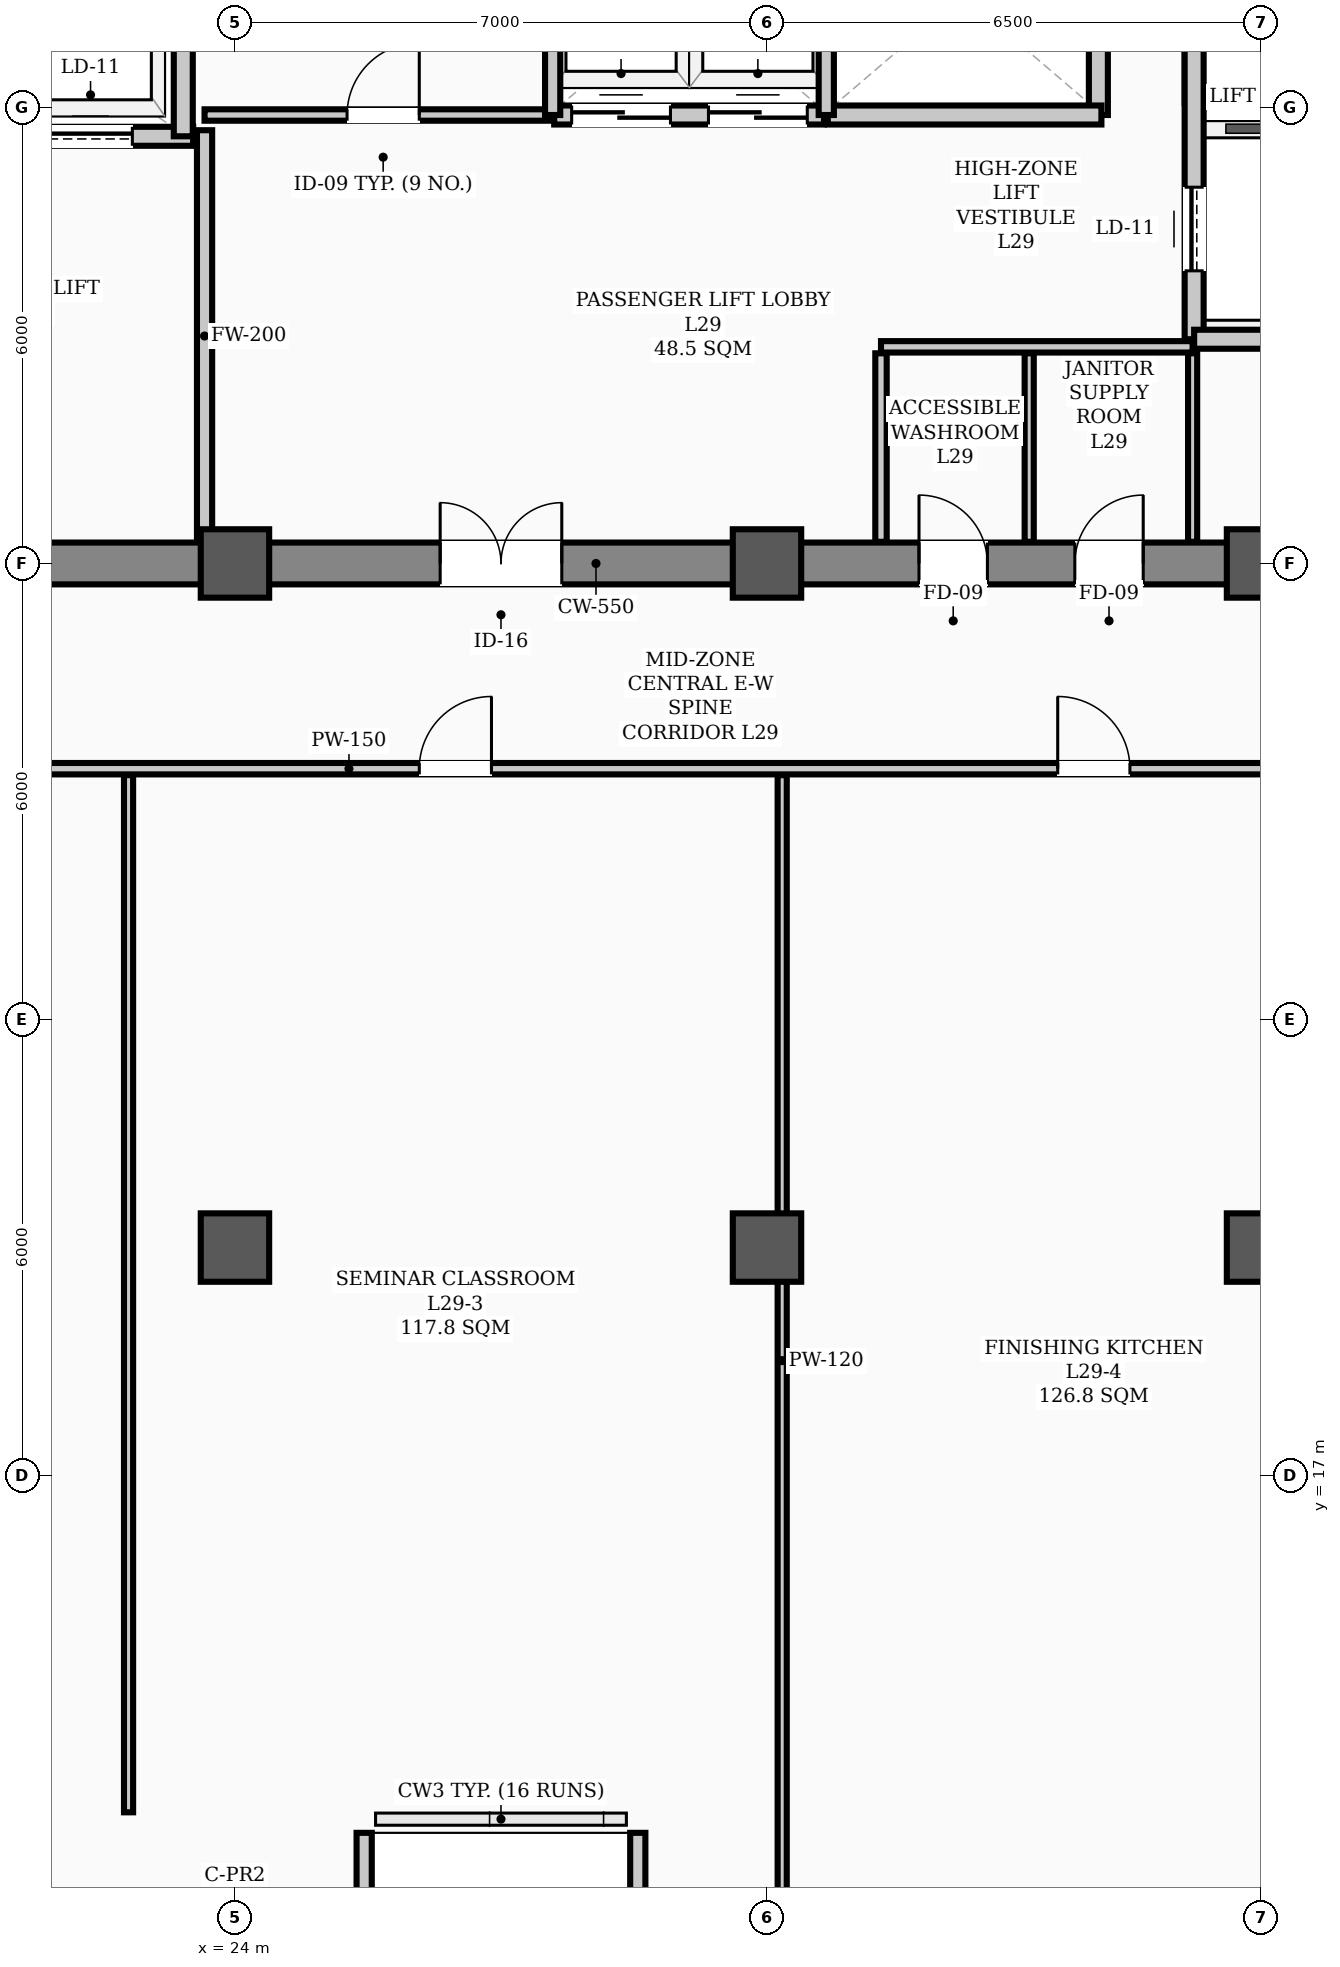
"""IFC4 building model, lengths in metres.
Left out: names, types, materials, properties, quantities, classifications, styles, units other than length and angle.
Written with IfcOpenShell. Run it as: python <this file> out.ifc"""

import sys

from ifc_helpers import new_model, si_unit, direction, frame, frame_2d, origin, origin_2d, place, context, subcontext, project, spatial, rectangle, hollow_rectangle, extrude, element, fill, save


model = new_model("IFC4")
c1 = context("Model", 3, precision=1e-05, world=origin(), true_north=direction((0.0, 1.0)))
c2 = subcontext(c1, "Body", "Model", "MODEL_VIEW")
j1 = project(units=[si_unit("LENGTHUNIT", "METRE"), si_unit("PLANEANGLEUNIT", "RADIAN")], contexts=[c1])
p1 = place(None, origin())
s1 = spatial("IfcSite", under=j1, at=p1, CompositionType="ELEMENT")
p2 = place(p1, origin())
s2 = spatial("IfcBuilding", under=s1, at=p2, CompositionType="ELEMENT")
p3 = place(p2, frame((0.0, 0.0, 118.8)))
s3 = spatial("IfcBuildingStorey", under=s2, at=p3, CompositionType="ELEMENT", Elevation=118.8)
for number, where, z_axis, x_axis in (
    (1, (24.0, 29.0, 0.0), (0.0, 0.0, 1.0), (1.0, 0.0, 0.0)),
    (2, (31.0, 29.0, 0.0), (0.0, 0.0, 1.0), (1.0, 0.0, 0.0)),
    (3, (37.5, 29.0, 0.0), (0.0, 0.0, 1.0), (1.0, 0.0, 0.0)),
    (4, (24.0, 20.0, 0.0), (0.0, 0.0, 1.0), (1.0, 0.0, 0.0)),
    (5, (31.0, 20.0, 0.0), (0.0, 0.0, 1.0), (1.0, 0.0, 0.0)),
    (6, (37.5, 20.0, 0.0), (0.0, 0.0, 1.0), (1.0, 0.0, 0.0)),
):
    element("IfcColumn", number, at=place(p3, frame(where, z_axis=z_axis, x_axis=x_axis)), inside=s3, PredefinedType="COLUMN", context=c2, shape_type="SweptSolid", body=[
        extrude(hollow_rectangle(XDim=0.9, YDim=0.9, WallThickness=0.035, InnerFilletRadius=0.017, OuterFilletRadius=0.052, at=origin_2d()), origin(), (0.0, 0.0, 1.0), 3.9),
    ])
for number, where, z_axis, x_axis in (
    (7, (25.7, 10.6, 0.0), (0.0, 0.0, 1.0), (0.0, 1.0, 0.0)),
    (8, (29.3, 12.3, 0.0), (0.0, 0.0, 1.0), (0.0, -1.0, 0.0)),
):
    element("IfcWall", number, at=place(p3, frame(where, z_axis=z_axis, x_axis=x_axis)), inside=s3, PredefinedType="PARAPET", context=c2, shape_type="SweptSolid", body=[
        extrude(rectangle(XDim=1.7, YDim=0.2, at=frame_2d((0.85, 0.0))), origin(), (0.0, 0.0, 1.0), 1.2),
    ])
p4 = place(p3, frame((13.5, 29.0, 0.0), z_axis=(0.0, 0.0, 1.0), x_axis=(1.0, 0.0, 0.0)))
e9 = element("IfcWall", 9, at=p4, inside=s3, PredefinedType="SHEAR", context=c2, shape_type="SweptSolid", body=[
    extrude(rectangle(XDim=30.5, YDim=0.55, at=frame_2d((15.25, 0.0))), origin(), (0.0, 0.0, 1.0), 3.72),
])
p5 = place(p4, frame((1.75, 0.0, 0.0)))
e10 = element("IfcOpeningElement", 10, at=p5, cuts=e9, PredefinedType="OPENING", context=c2, shape_type="SweptSolid", body=[
    extrude(rectangle(XDim=1.1, YDim=2.08, at=frame_2d((0.55, 1.04))), frame((0.0, 0.285, 0.0), z_axis=(0.0, -1.0, 0.0), x_axis=(1.0, 0.0, 0.0)), (0.0, 0.0, 1.0), 0.57),
])
p6 = place(p4, frame((26.7, 0.0, 0.0)))
e11 = element("IfcOpeningElement", 11, at=p6, cuts=e9, PredefinedType="OPENING", context=c2, shape_type="SweptSolid", body=[
    extrude(rectangle(XDim=1.1, YDim=2.08, at=frame_2d((0.55, 1.04))), frame((0.0, 0.285, 0.0), z_axis=(0.0, -1.0, 0.0), x_axis=(1.0, 0.0, 0.0)), (0.0, 0.0, 1.0), 0.57),
])
p7 = place(p4, frame((6.8, 0.0, 0.0)))
e12 = element("IfcOpeningElement", 12, at=p7, cuts=e9, PredefinedType="OPENING", context=c2, shape_type="SweptSolid", body=[
    extrude(rectangle(XDim=1.1, YDim=2.08, at=frame_2d((0.55, 1.04))), frame((0.0, 0.285, 0.0), z_axis=(0.0, -1.0, 0.0), x_axis=(1.0, 0.0, 0.0)), (0.0, 0.0, 1.0), 0.57),
])
p8 = place(p4, frame((13.2, 0.0, 0.0)))
e13 = element("IfcOpeningElement", 13, at=p8, cuts=e9, PredefinedType="OPENING", context=c2, shape_type="SweptSolid", body=[
    extrude(rectangle(XDim=1.6, YDim=2.08, at=frame_2d((0.8, 1.04))), frame((0.0, 0.285, 0.0), z_axis=(0.0, -1.0, 0.0), x_axis=(1.0, 0.0, 0.0)), (0.0, 0.0, 1.0), 0.57),
])
p9 = place(p4, frame((19.5, 0.0, 0.0)))
e14 = element("IfcOpeningElement", 14, at=p9, cuts=e9, PredefinedType="OPENING", context=c2, shape_type="SweptSolid", body=[
    extrude(rectangle(XDim=0.9, YDim=2.08, at=frame_2d((0.45, 1.04))), frame((0.0, 0.285, 0.0), z_axis=(0.0, -1.0, 0.0), x_axis=(1.0, 0.0, 0.0)), (0.0, 0.0, 1.0), 0.57),
])
p10 = place(p4, frame((21.55, 0.0, 0.0)))
e15 = element("IfcOpeningElement", 15, at=p10, cuts=e9, PredefinedType="OPENING", context=c2, shape_type="SweptSolid", body=[
    extrude(rectangle(XDim=0.9, YDim=2.08, at=frame_2d((0.45, 1.04))), frame((0.0, 0.285, 0.0), z_axis=(0.0, -1.0, 0.0), x_axis=(1.0, 0.0, 0.0)), (0.0, 0.0, 1.0), 0.57),
])
p11 = place(p3, frame((18.1, 34.62, 0.0), z_axis=(0.0, 0.0, 1.0), x_axis=(1.0, 0.0, 0.0)))
e16 = element("IfcWall", 16, at=p11, inside=s3, PredefinedType="STANDARD", context=c2, shape_type="SweptSolid", body=[
    extrude(rectangle(XDim=5.35, YDim=0.25, at=frame_2d((2.675, 0.0))), origin(), (0.0, 0.0, 1.0), 3.72),
])
p12 = place(p11, frame((0.85, 0.0, 0.0)))
e17 = element("IfcOpeningElement", 17, at=p12, cuts=e16, PredefinedType="OPENING", context=c2, shape_type="SweptSolid", body=[
    extrude(rectangle(XDim=1.1, YDim=2.08, at=frame_2d((0.55, 1.04))), frame((0.0, 0.135, 0.0), z_axis=(0.0, -1.0, 0.0), x_axis=(1.0, 0.0, 0.0)), (0.0, 0.0, 1.0), 0.27),
])
p13 = place(p11, frame((3.45, 0.0, 0.0)))
e18 = element("IfcOpeningElement", 18, at=p13, cuts=e16, PredefinedType="OPENING", context=c2, shape_type="SweptSolid", body=[
    extrude(rectangle(XDim=1.1, YDim=2.08, at=frame_2d((0.55, 1.04))), frame((0.0, 0.135, 0.0), z_axis=(0.0, -1.0, 0.0), x_axis=(1.0, 0.0, 0.0)), (0.0, 0.0, 1.0), 0.27),
])
p14 = place(p3, frame((36.62, 31.95, 0.0), z_axis=(0.0, 0.0, 1.0), x_axis=(0.0, 1.0, 0.0)))
e19 = element("IfcWall", 19, at=p14, inside=s3, PredefinedType="STANDARD", context=c2, shape_type="SweptSolid", body=[
    extrude(rectangle(XDim=6.0, YDim=0.25, at=frame_2d((3.0, 0.0))), origin(), (0.0, 0.0, 1.0), 3.72),
])
p15 = place(p14, frame((0.9, 0.0, 0.0)))
e20 = element("IfcOpeningElement", 20, at=p15, cuts=e19, PredefinedType="OPENING", context=c2, shape_type="SweptSolid", body=[
    extrude(rectangle(XDim=1.1, YDim=2.08, at=frame_2d((0.55, 1.04))), frame((0.0, 0.135, 0.0), z_axis=(0.0, -1.0, 0.0), x_axis=(1.0, 0.0, 0.0)), (0.0, 0.0, 1.0), 0.27),
])
p16 = place(p14, frame((4.0, 0.0, 0.0)))
e21 = element("IfcOpeningElement", 21, at=p16, cuts=e19, PredefinedType="OPENING", context=c2, shape_type="SweptSolid", body=[
    extrude(rectangle(XDim=1.1, YDim=2.08, at=frame_2d((0.55, 1.04))), frame((0.0, 0.135, 0.0), z_axis=(0.0, -1.0, 0.0), x_axis=(1.0, 0.0, 0.0)), (0.0, 0.0, 1.0), 0.27),
])
p17 = place(p3, frame((36.62, 31.95, 0.0), z_axis=(0.0, 0.0, 1.0), x_axis=(1.0, 0.0, 0.0)))
e22 = element("IfcWall", 22, at=p17, inside=s3, PredefinedType="STANDARD", context=c2, shape_type="SweptSolid", body=[
    extrude(rectangle(XDim=1.9, YDim=0.25, at=frame_2d((0.95, 0.0))), origin(), (0.0, 0.0, 1.0), 3.48),
])
p18 = place(p3, frame((23.32, 34.62, 0.0), z_axis=(0.0, 0.0, 1.0), x_axis=(0.0, 1.0, 0.0)))
e23 = element("IfcWall", 23, at=p18, inside=s3, PredefinedType="STANDARD", context=c2, shape_type="SweptSolid", body=[
    extrude(rectangle(XDim=3.33, YDim=0.25, at=frame_2d((1.665, 0.0))), origin(), (0.0, 0.0, 1.0), 3.72),
])
p19 = place(p3, frame((35.36, 34.9, 0.0), z_axis=(0.0, 0.0, 1.0), x_axis=(0.0, 1.0, 0.0)))
e24 = element("IfcWall", 24, at=p19, inside=s3, PredefinedType="STANDARD", context=c2, shape_type="SweptSolid", body=[
    extrude(rectangle(XDim=3.05, YDim=0.25, at=frame_2d((1.525, 0.0))), origin(), (0.0, 0.0, 1.0), 3.72),
])
p20 = place(p3, frame((28.2, 34.9, 0.0), z_axis=(0.0, 0.0, 1.0), x_axis=(1.0, 0.0, 0.0)))
e25 = element("IfcWall", 25, at=p20, inside=s3, PredefinedType="STANDARD", context=c2, shape_type="SweptSolid", body=[
    extrude(rectangle(XDim=3.55, YDim=0.25, at=frame_2d((1.775, 0.0))), origin(), (0.0, 0.0, 1.0), 3.72),
])
p21 = place(p20, frame((0.23, 0.0, 0.0)))
e26 = element("IfcOpeningElement", 26, at=p21, cuts=e25, PredefinedType="OPENING", context=c2, shape_type="SweptSolid", body=[
    extrude(rectangle(XDim=1.3, YDim=2.08, at=frame_2d((0.65, 1.04))), frame((0.0, 0.135, 0.0), z_axis=(0.0, -1.0, 0.0), x_axis=(1.0, 0.0, 0.0)), (0.0, 0.0, 1.0), 0.27),
])
p22 = place(p20, frame((2.03, 0.0, 0.0)))
e27 = element("IfcOpeningElement", 27, at=p22, cuts=e25, PredefinedType="OPENING", context=c2, shape_type="SweptSolid", body=[
    extrude(rectangle(XDim=1.3, YDim=2.08, at=frame_2d((0.65, 1.04))), frame((0.0, 0.135, 0.0), z_axis=(0.0, -1.0, 0.0), x_axis=(1.0, 0.0, 0.0)), (0.0, 0.0, 1.0), 0.27),
])
p23 = place(p3, frame((31.8, 34.9, 0.0), z_axis=(0.0, 0.0, 1.0), x_axis=(1.0, 0.0, 0.0)))
e28 = element("IfcWall", 28, at=p23, inside=s3, PredefinedType="STANDARD", context=c2, shape_type="SweptSolid", body=[
    extrude(rectangle(XDim=3.6, YDim=0.25, at=frame_2d((1.8, 0.0))), origin(), (0.0, 0.0, 1.0), 3.72),
])
p24 = place(p3, frame((23.6, 34.9, 0.0), z_axis=(0.0, 0.0, 1.0), x_axis=(1.0, 0.0, 0.0)))
e29 = element("IfcWall", 29, at=p24, inside=s3, PredefinedType="PARTITIONING", context=c2, shape_type="SweptSolid", body=[
    extrude(rectangle(XDim=4.58, YDim=0.15, at=frame_2d((2.29, 0.0))), origin(), (0.0, 0.0, 1.0), 3.72),
])
p25 = place(p24, frame((1.875, 0.0, 0.0)))
e30 = element("IfcOpeningElement", 30, at=p25, cuts=e29, PredefinedType="OPENING", context=c2, shape_type="SweptSolid", body=[
    extrude(rectangle(XDim=0.95, YDim=2.08, at=frame_2d((0.475, 1.04))), frame((0.0, 0.085, 0.0), z_axis=(0.0, -1.0, 0.0), x_axis=(1.0, 0.0, 0.0)), (0.0, 0.0, 1.0), 0.17),
])
p26 = place(p3, frame((32.5, 31.85, 0.0), z_axis=(0.0, 0.0, 1.0), x_axis=(1.0, 0.0, 0.0)))
e31 = element("IfcWall", 31, at=p26, inside=s3, PredefinedType="PARTITIONING", context=c2, shape_type="SweptSolid", body=[
    extrude(rectangle(XDim=4.1, YDim=0.15, at=frame_2d((2.05, 0.0))), origin(), (0.0, 0.0, 1.0), 3.72),
])
p27 = place(p3, frame((2.31, 26.3, 0.0), z_axis=(0.0, 0.0, 1.0), x_axis=(1.0, 0.0, 0.0)))
e32 = element("IfcWall", 32, at=p27, inside=s3, PredefinedType="PARTITIONING", context=c2, shape_type="SweptSolid", body=[
    extrude(rectangle(XDim=46.38, YDim=0.15, at=frame_2d((23.19, 0.0))), origin(), (0.0, 0.0, 1.0), 3.1),
])
p28 = place(p27, frame((10.19, 0.0, 0.0)))
e33 = element("IfcOpeningElement", 33, at=p28, cuts=e32, PredefinedType="OPENING", context=c2, shape_type="SweptSolid", body=[
    extrude(rectangle(XDim=0.95, YDim=2.08, at=frame_2d((0.475, 1.04))), frame((0.0, 0.085, 0.0), z_axis=(0.0, -1.0, 0.0), x_axis=(1.0, 0.0, 0.0)), (0.0, 0.0, 1.0), 0.17),
])
p29 = place(p27, frame((15.915, 0.0, 0.0)))
e34 = element("IfcOpeningElement", 34, at=p29, cuts=e32, PredefinedType="OPENING", context=c2, shape_type="SweptSolid", body=[
    extrude(rectangle(XDim=0.95, YDim=2.08, at=frame_2d((0.475, 1.04))), frame((0.0, 0.085, 0.0), z_axis=(0.0, -1.0, 0.0), x_axis=(1.0, 0.0, 0.0)), (0.0, 0.0, 1.0), 0.17),
])
p30 = place(p27, frame((24.115, 0.0, 0.0)))
e35 = element("IfcOpeningElement", 35, at=p30, cuts=e32, PredefinedType="OPENING", context=c2, shape_type="SweptSolid", body=[
    extrude(rectangle(XDim=0.95, YDim=2.08, at=frame_2d((0.475, 1.04))), frame((0.0, 0.085, 0.0), z_axis=(0.0, -1.0, 0.0), x_axis=(1.0, 0.0, 0.0)), (0.0, 0.0, 1.0), 0.17),
])
p31 = place(p27, frame((32.515, 0.0, 0.0)))
e36 = element("IfcOpeningElement", 36, at=p31, cuts=e32, PredefinedType="OPENING", context=c2, shape_type="SweptSolid", body=[
    extrude(rectangle(XDim=0.95, YDim=2.08, at=frame_2d((0.475, 1.04))), frame((0.0, 0.085, 0.0), z_axis=(0.0, -1.0, 0.0), x_axis=(1.0, 0.0, 0.0)), (0.0, 0.0, 1.0), 0.17),
])
p32 = place(p27, frame((37.665, 0.0, 0.0)))
e37 = element("IfcOpeningElement", 37, at=p32, cuts=e32, PredefinedType="OPENING", context=c2, shape_type="SweptSolid", body=[
    extrude(rectangle(XDim=0.95, YDim=2.08, at=frame_2d((0.475, 1.04))), frame((0.0, 0.085, 0.0), z_axis=(0.0, -1.0, 0.0), x_axis=(1.0, 0.0, 0.0)), (0.0, 0.0, 1.0), 0.17),
])
p33 = place(p3, frame((23.6, 29.285, 0.0), z_axis=(0.0, 0.0, 1.0), x_axis=(0.0, 1.0, 0.0)))
e38 = element("IfcWall", 38, at=p33, inside=s3, PredefinedType="STANDARD", context=c2, shape_type="SweptSolid", body=[
    extrude(rectangle(XDim=5.415, YDim=0.2, at=frame_2d((2.708, 0.0))), origin(), (0.0, 0.0, 1.0), 3.1),
])
p34 = place(p3, frame((32.5, 29.285, 0.0), z_axis=(0.0, 0.0, 1.0), x_axis=(0.0, 1.0, 0.0)))
e39 = element("IfcWall", 39, at=p34, inside=s3, PredefinedType="PARTITIONING", context=c2, shape_type="SweptSolid", body=[
    extrude(rectangle(XDim=2.48, YDim=0.15, at=frame_2d((1.24, 0.0))), origin(), (0.0, 0.0, 1.0), 3.3),
])
for number, where, z_axis, x_axis in (
    (40, (36.6, 29.285, 0.0), (0.0, 0.0, 1.0), (0.0, 1.0, 0.0)),
    (41, (34.45, 29.285, 0.0), (0.0, 0.0, 1.0), (0.0, 1.0, 0.0)),
):
    element("IfcWall", number, at=place(p3, frame(where, z_axis=z_axis, x_axis=x_axis)), inside=s3, PredefinedType="PARTITIONING", context=c2, shape_type="SweptSolid", body=[
        extrude(rectangle(XDim=2.48, YDim=0.12, at=frame_2d((1.24, 0.0))), origin(), (0.0, 0.0, 1.0), 3.3),
    ])
p35 = place(p3, frame((22.6, 12.57, 0.0), z_axis=(0.0, 0.0, 1.0), x_axis=(0.0, 1.0, 0.0)))
e42 = element("IfcWall", 42, at=p35, inside=s3, PredefinedType="PARTITIONING", context=c2, shape_type="SweptSolid", body=[
    extrude(rectangle(XDim=13.645, YDim=0.12, at=frame_2d((6.823, 0.0))), origin(), (0.0, 0.0, 1.0), 3.0),
])
p36 = place(p3, frame((31.2, 10.81, 0.0), z_axis=(0.0, 0.0, 1.0), x_axis=(0.0, 1.0, 0.0)))
e43 = element("IfcWall", 43, at=p36, inside=s3, PredefinedType="PARTITIONING", context=c2, shape_type="SweptSolid", body=[
    extrude(rectangle(XDim=15.405, YDim=0.12, at=frame_2d((7.703, 0.0))), origin(), (0.0, 0.0, 1.0), 3.0),
])
for number, where, z_axis, x_axis in (
    (44, (28.18, 34.9, 0.0), (0.0, 0.0, 1.0), (0.0, 1.0, 0.0)),
    (45, (31.78, 34.9, 0.0), (0.0, 0.0, 1.0), (0.0, 1.0, 0.0)),
):
    element("IfcWall", number, at=place(p3, frame(where, z_axis=z_axis, x_axis=x_axis)), inside=s3, PredefinedType="STANDARD", context=c2, shape_type="SweptSolid", body=[
        extrude(rectangle(XDim=3.12, YDim=0.2, at=frame_2d((1.56, 0.0))), origin(), (0.0, 0.0, 1.0), 3.72),
    ])
p37 = place(p8, origin())
e46 = element("IfcDoor", 46, at=p37, inside=s3, OperationType="DOUBLE_DOOR_SINGLE_SWING", PredefinedType="DOOR", context=c2, shape_type="SweptSolid", body=[
    extrude(rectangle(XDim=1.6, YDim=2.08, at=frame_2d((0.8, 1.04))), frame((0.0, 0.025, 0.0), z_axis=(0.0, -1.0, 0.0), x_axis=(1.0, 0.0, 0.0)), (0.0, 0.0, 1.0), 0.05),
])
fill(e13, e46)
p38 = place(p25, origin())
e47 = element("IfcDoor", 47, at=p38, inside=s3, OperationType="SINGLE_SWING_RIGHT", PredefinedType="DOOR", context=c2, shape_type="SweptSolid", body=[
    extrude(rectangle(XDim=0.95, YDim=2.08, at=frame_2d((0.475, 1.04))), frame((0.0, 0.025, 0.0), z_axis=(0.0, -1.0, 0.0), x_axis=(1.0, 0.0, 0.0)), (0.0, 0.0, 1.0), 0.05),
])
fill(e30, e47)
p39 = place(p9, origin())
e48 = element("IfcDoor", 48, at=p39, inside=s3, OperationType="SINGLE_SWING_LEFT", PredefinedType="DOOR", context=c2, shape_type="SweptSolid", body=[
    extrude(rectangle(XDim=0.9, YDim=2.08, at=frame_2d((0.45, 1.04))), frame((0.0, 0.025, 0.0), z_axis=(0.0, -1.0, 0.0), x_axis=(1.0, 0.0, 0.0)), (0.0, 0.0, 1.0), 0.05),
])
fill(e14, e48)
p40 = place(p10, origin())
e49 = element("IfcDoor", 49, at=p40, inside=s3, OperationType="SINGLE_SWING_RIGHT", PredefinedType="DOOR", context=c2, shape_type="SweptSolid", body=[
    extrude(rectangle(XDim=0.9, YDim=2.08, at=frame_2d((0.45, 1.04))), frame((0.0, 0.025, 0.0), z_axis=(0.0, -1.0, 0.0), x_axis=(1.0, 0.0, 0.0)), (0.0, 0.0, 1.0), 0.05),
])
fill(e15, e49)
p41 = place(p30, origin())
e50 = element("IfcDoor", 50, at=p41, inside=s3, OperationType="SINGLE_SWING_RIGHT", PredefinedType="DOOR", context=c2, shape_type="SweptSolid", body=[
    extrude(rectangle(XDim=0.95, YDim=2.08, at=frame_2d((0.475, 1.04))), frame((0.0, 0.025, 0.0), z_axis=(0.0, -1.0, 0.0), x_axis=(1.0, 0.0, 0.0)), (0.0, 0.0, 1.0), 0.05),
])
fill(e35, e50)
p42 = place(p31, origin())
e51 = element("IfcDoor", 51, at=p42, inside=s3, OperationType="SINGLE_SWING_LEFT", PredefinedType="DOOR", context=c2, shape_type="SweptSolid", body=[
    extrude(rectangle(XDim=0.95, YDim=2.08, at=frame_2d((0.475, 1.04))), frame((0.0, 0.025, 0.0), z_axis=(0.0, -1.0, 0.0), x_axis=(1.0, 0.0, 0.0)), (0.0, 0.0, 1.0), 0.05),
])
fill(e36, e51)
p43 = place(p13, origin())
e52 = element("IfcDoor", 52, at=p43, inside=s3, OperationType="SLIDING_TO_LEFT", PredefinedType="DOOR", context=c2, shape_type="SweptSolid", body=[
    extrude(rectangle(XDim=1.1, YDim=2.08, at=frame_2d((0.55, 1.04))), frame((0.0, 0.025, 0.0), z_axis=(0.0, -1.0, 0.0), x_axis=(1.0, 0.0, 0.0)), (0.0, 0.0, 1.0), 0.05),
])
fill(e18, e52)
p44 = place(p15, origin())
e53 = element("IfcDoor", 53, at=p44, inside=s3, OperationType="SLIDING_TO_LEFT", PredefinedType="DOOR", context=c2, shape_type="SweptSolid", body=[
    extrude(rectangle(XDim=1.1, YDim=2.08, at=frame_2d((0.55, 1.04))), frame((0.0, 0.025, 0.0), z_axis=(0.0, -1.0, 0.0), x_axis=(1.0, 0.0, 0.0)), (0.0, 0.0, 1.0), 0.05),
])
fill(e20, e53)
p45 = place(p21, origin())
e54 = element("IfcDoor", 54, at=p45, inside=s3, OperationType="DOUBLE_DOOR_SLIDING", PredefinedType="DOOR", context=c2, shape_type="SweptSolid", body=[
    extrude(rectangle(XDim=1.3, YDim=2.08, at=frame_2d((0.65, 1.04))), frame((0.0, 0.025, 0.0), z_axis=(0.0, -1.0, 0.0), x_axis=(1.0, 0.0, 0.0)), (0.0, 0.0, 1.0), 0.05),
])
fill(e26, e54)
p46 = place(p22, origin())
e55 = element("IfcDoor", 55, at=p46, inside=s3, OperationType="DOUBLE_DOOR_SLIDING", PredefinedType="DOOR", context=c2, shape_type="SweptSolid", body=[
    extrude(rectangle(XDim=1.3, YDim=2.08, at=frame_2d((0.65, 1.04))), frame((0.0, 0.025, 0.0), z_axis=(0.0, -1.0, 0.0), x_axis=(1.0, 0.0, 0.0)), (0.0, 0.0, 1.0), 0.05),
])
fill(e27, e55)
save(model, sys.argv[1])
